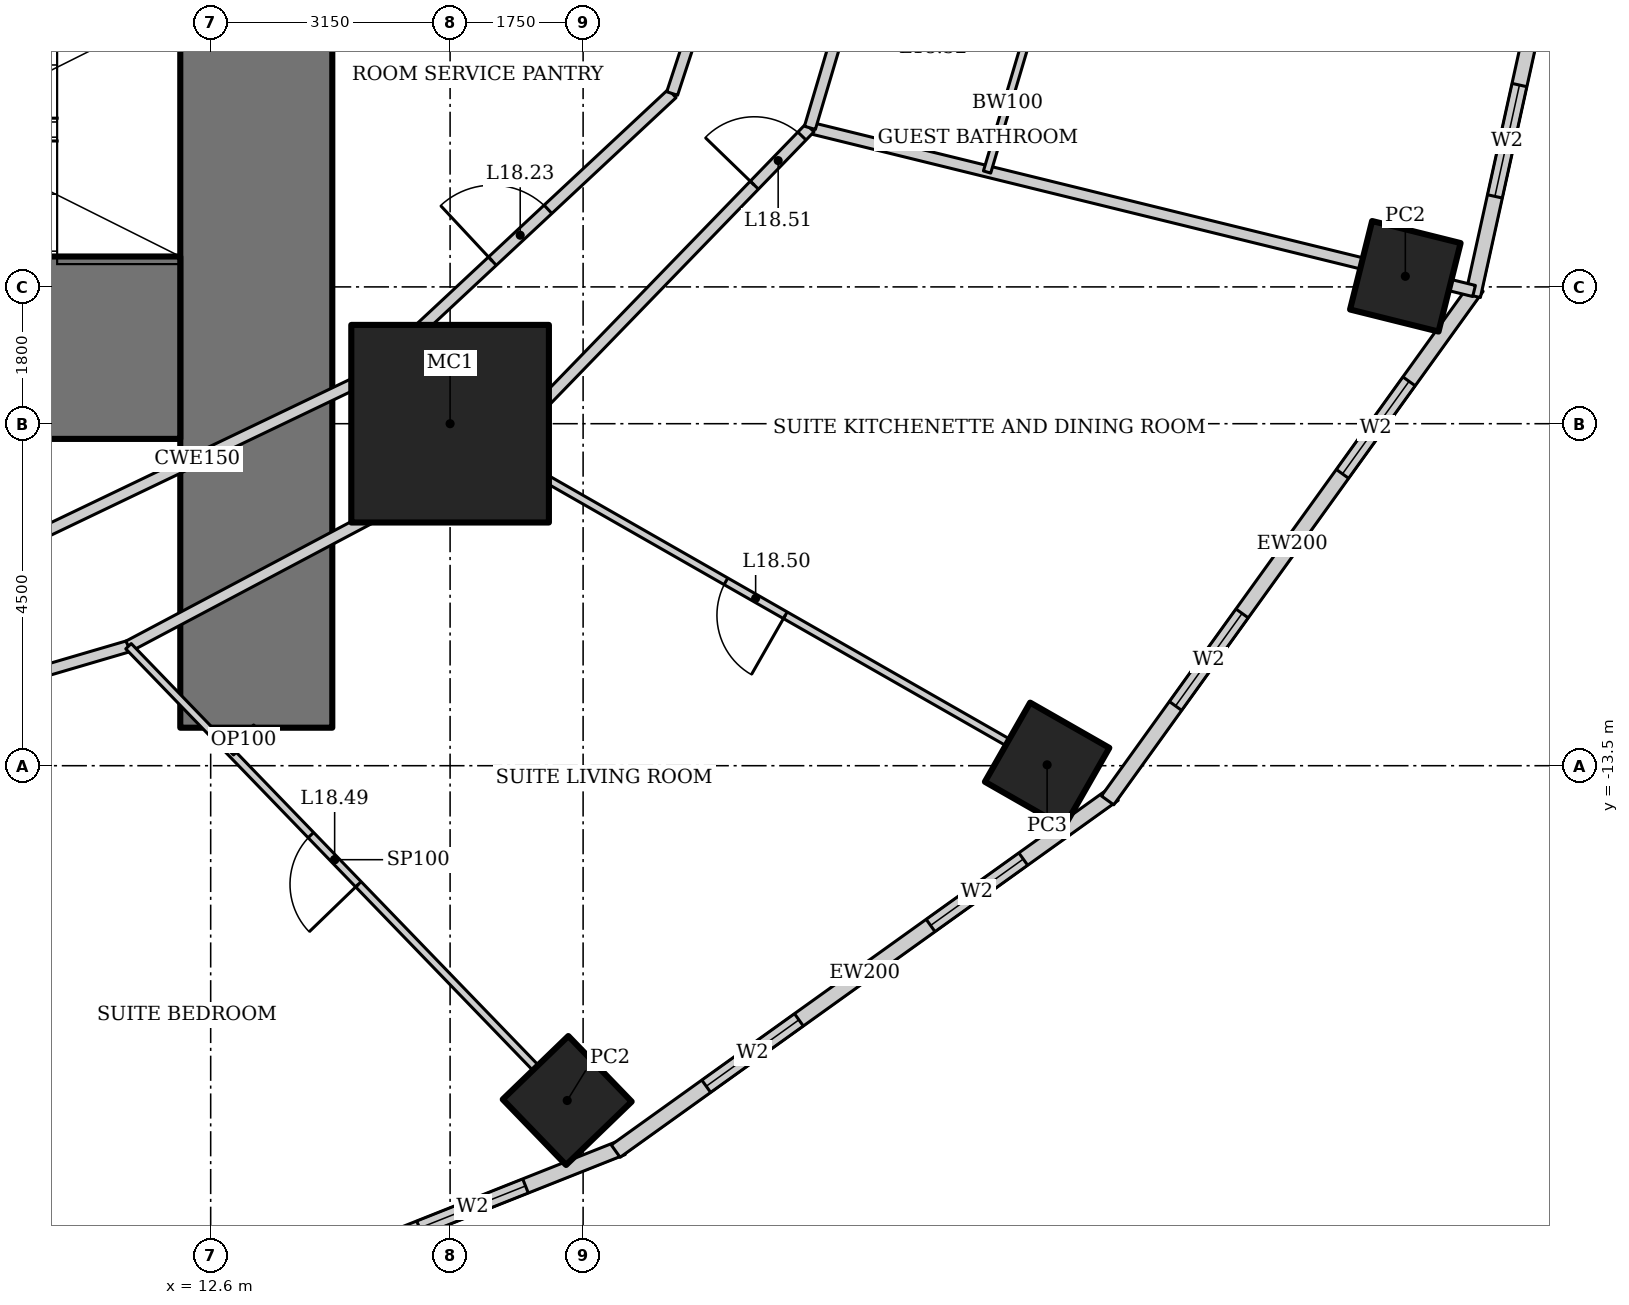
"""IFC4 building model, lengths in metres.
Left out: names, types, materials, properties, quantities, classifications, styles, units other than length and angle.
Written with IfcOpenShell. Run it as: python <this file> out.ifc"""

import sys

from ifc_helpers import new_model, si_unit, direction, frame, frame_2d, origin, origin_2d, place, context, subcontext, project, spatial, rectangle, hollow_rectangle, extrude, element, fill, save


model = new_model("IFC4")
c1 = context("Model", 3, precision=1e-05, world=origin(), true_north=direction((0.0, 1.0)))
c2 = subcontext(c1, "Body", "Model", "MODEL_VIEW")
j1 = project(units=[si_unit("LENGTHUNIT", "METRE"), si_unit("PLANEANGLEUNIT", "RADIAN")], contexts=[c1])
p1 = place(None, origin())
s1 = spatial("IfcSite", under=j1, at=p1, CompositionType="ELEMENT")
p2 = place(p1, origin())
s2 = spatial("IfcBuilding", under=s1, at=p2, CompositionType="ELEMENT")
p3 = place(p2, frame((0.0, 0.0, 80.2)))
s3 = spatial("IfcBuildingStorey", under=s2, at=p3, CompositionType="ELEMENT", Elevation=80.2)
p4 = place(p3, frame((15.75, -9.0, 0.0), z_axis=(0.0, 0.0, 1.0), x_axis=(1.0, 0.0, 0.0)))
e1 = element("IfcColumn", 1, at=p4, inside=s3, PredefinedType="COLUMN", context=c2, shape_type="SweptSolid", body=[
    extrude(hollow_rectangle(XDim=2.6, YDim=2.6, WallThickness=0.13, at=origin_2d()), origin(), (0.0, 0.0, 1.0), 3.6),
])
p5 = place(p3, frame((17.291, -17.905, 0.0), z_axis=(0.0, 0.0, 1.0), x_axis=(0.719339800339, 0.694658370459, 0.0)))
e2 = element("IfcColumn", 2, at=p5, inside=s3, PredefinedType="COLUMN", context=c2, shape_type="SweptSolid", body=[
    extrude(hollow_rectangle(XDim=1.2, YDim=1.2, WallThickness=0.1, at=origin_2d()), origin(), (0.0, 0.0, 1.0), 3.6),
])
p6 = place(p3, frame((23.605, -13.489, 0.0), z_axis=(0.0, 0.0, 1.0), x_axis=(0.496139221777, 0.86824298017, 0.0)))
e3 = element("IfcColumn", 3, at=p6, inside=s3, PredefinedType="COLUMN", context=c2, shape_type="SweptSolid", body=[
    extrude(hollow_rectangle(XDim=1.2, YDim=1.2, WallThickness=0.12, at=origin_2d()), origin(), (0.0, 0.0, 1.0), 3.6),
])
p7 = place(p3, frame((28.318, -7.06, 0.0), z_axis=(0.0, 0.0, 1.0), x_axis=(0.2419218956, 0.970295726276, 0.0)))
e4 = element("IfcColumn", 4, at=p7, inside=s3, PredefinedType="COLUMN", context=c2, shape_type="SweptSolid", body=[
    extrude(hollow_rectangle(XDim=1.2, YDim=1.2, WallThickness=0.1, at=origin_2d()), origin(), (0.0, 0.0, 1.0), 3.6),
])
p8 = place(p3, frame((13.2, -13.0, 0.0), z_axis=(0.0, 0.0, 1.0), x_axis=(0.0, 1.0, 0.0)))
e5 = element("IfcWall", 5, at=p8, inside=s3, PredefinedType="SHEAR", context=c2, shape_type="SweptSolid", body=[
    extrude(rectangle(XDim=26.0, YDim=2.0, at=frame_2d((13.0, 0.0))), origin(), (0.0, 0.0, 1.0), 3.6),
])
p9 = place(p8, frame((12.1, 0.0, 0.0)))
e6 = element("IfcOpeningElement", 6, at=p9, cuts=e5, PredefinedType="OPENING", context=c2, shape_type="SweptSolid", body=[
    extrude(rectangle(XDim=1.8, YDim=2.1, at=frame_2d((0.9, 1.05))), frame((0.0, 1.01, 0.0), z_axis=(0.0, -1.0, 0.0), x_axis=(1.0, 0.0, 0.0)), (0.0, 0.0, 1.0), 2.02),
])
p10 = place(p3, frame((-12.2, -8.0, 0.0), z_axis=(0.0, 0.0, 1.0), x_axis=(1.0, 0.0, 0.0)))
e7 = element("IfcWall", 7, at=p10, inside=s3, PredefinedType="SHEAR", context=c2, shape_type="SweptSolid", body=[
    extrude(rectangle(XDim=24.4, YDim=2.4, at=frame_2d((12.2, 0.0))), origin(), (0.0, 0.0, 1.0), 3.6),
])
p11 = place(p3, frame((10.869, -21.363, 0.0), z_axis=(0.0, 0.0, 1.0), x_axis=(0.929358351251, 0.369178892895, 0.0)))
e8 = element("IfcWall", 8, at=p11, inside=s3, PredefinedType="SOLIDWALL", context=c2, shape_type="SweptSolid", body=[
    extrude(rectangle(XDim=7.692, YDim=0.2, at=frame_2d((3.846, 0.0))), origin(), (0.0, 0.0, 1.0), 3.45),
])
p12 = place(p11, frame((1.373, 0.0, 0.5)))
e9 = element("IfcOpeningElement", 9, at=p12, cuts=e8, PredefinedType="OPENING", context=c2, shape_type="SweptSolid", body=[
    extrude(rectangle(XDim=1.5, YDim=2.2, at=frame_2d((0.75, 1.1))), frame((0.0, 0.11, 0.0), z_axis=(0.0, -1.0, 0.0), x_axis=(1.0, 0.0, 0.0)), (0.0, 0.0, 1.0), 0.22),
])
p13 = place(p11, frame((4.819, 0.0, 0.5)))
e10 = element("IfcOpeningElement", 10, at=p13, cuts=e8, PredefinedType="OPENING", context=c2, shape_type="SweptSolid", body=[
    extrude(rectangle(XDim=1.5, YDim=2.2, at=frame_2d((0.75, 1.1))), frame((0.0, 0.11, 0.0), z_axis=(0.0, -1.0, 0.0), x_axis=(1.0, 0.0, 0.0)), (0.0, 0.0, 1.0), 0.22),
])
p14 = place(p3, frame((17.929, -18.572, 0.0), z_axis=(0.0, 0.0, 1.0), x_axis=(0.812791321576, 0.582554948112, 0.0)))
e11 = element("IfcWall", 11, at=p14, inside=s3, PredefinedType="SOLIDWALL", context=c2, shape_type="SweptSolid", body=[
    extrude(rectangle(XDim=8.063, YDim=0.2, at=frame_2d((4.032, 0.0))), origin(), (0.0, 0.0, 1.0), 3.45),
])
p15 = place(p14, frame((1.466, 0.0, 0.5)))
e12 = element("IfcOpeningElement", 12, at=p15, cuts=e11, PredefinedType="OPENING", context=c2, shape_type="SweptSolid", body=[
    extrude(rectangle(XDim=1.5, YDim=2.2, at=frame_2d((0.75, 1.1))), frame((0.0, 0.11, 0.0), z_axis=(0.0, -1.0, 0.0), x_axis=(1.0, 0.0, 0.0)), (0.0, 0.0, 1.0), 0.22),
])
p16 = place(p14, frame((5.097, 0.0, 0.5)))
e13 = element("IfcOpeningElement", 13, at=p16, cuts=e11, PredefinedType="OPENING", context=c2, shape_type="SweptSolid", body=[
    extrude(rectangle(XDim=1.5, YDim=2.2, at=frame_2d((0.75, 1.1))), frame((0.0, 0.11, 0.0), z_axis=(0.0, -1.0, 0.0), x_axis=(1.0, 0.0, 0.0)), (0.0, 0.0, 1.0), 0.22),
])
p17 = place(p3, frame((24.4, -13.957, 0.0), z_axis=(0.0, 0.0, 1.0), x_axis=(0.583937613703, 0.811798536155, 0.0)))
e14 = element("IfcWall", 14, at=p17, inside=s3, PredefinedType="SOLIDWALL", context=c2, shape_type="SweptSolid", body=[
    extrude(rectangle(XDim=8.323, YDim=0.2, at=frame_2d((4.162, 0.0))), origin(), (0.0, 0.0, 1.0), 3.45),
])
p18 = place(p17, frame((1.531, 0.0, 0.5)))
e15 = element("IfcOpeningElement", 15, at=p18, cuts=e14, PredefinedType="OPENING", context=c2, shape_type="SweptSolid", body=[
    extrude(rectangle(XDim=1.5, YDim=2.2, at=frame_2d((0.75, 1.1))), frame((0.0, 0.11, 0.0), z_axis=(0.0, -1.0, 0.0), x_axis=(1.0, 0.0, 0.0)), (0.0, 0.0, 1.0), 0.22),
])
p19 = place(p17, frame((5.292, 0.0, 0.5)))
e16 = element("IfcOpeningElement", 16, at=p19, cuts=e14, PredefinedType="OPENING", context=c2, shape_type="SweptSolid", body=[
    extrude(rectangle(XDim=1.5, YDim=2.2, at=frame_2d((0.75, 1.1))), frame((0.0, 0.11, 0.0), z_axis=(0.0, -1.0, 0.0), x_axis=(1.0, 0.0, 0.0)), (0.0, 0.0, 1.0), 0.22),
])
p20 = place(p3, frame((29.208, -7.318, 0.0), z_axis=(0.0, 0.0, 1.0), x_axis=(0.215238065514, 0.976561608478, 0.0)))
e17 = element("IfcWall", 17, at=p20, inside=s3, PredefinedType="SOLIDWALL", context=c2, shape_type="SweptSolid", body=[
    extrude(rectangle(XDim=7.562, YDim=0.2, at=frame_2d((3.781, 0.0))), origin(), (0.0, 0.0, 1.0), 3.45),
])
p21 = place(p20, frame((1.341, 0.0, 0.5)))
e18 = element("IfcOpeningElement", 18, at=p21, cuts=e17, PredefinedType="OPENING", context=c2, shape_type="SweptSolid", body=[
    extrude(rectangle(XDim=1.5, YDim=2.2, at=frame_2d((0.75, 1.1))), frame((0.0, 0.11, 0.0), z_axis=(0.0, -1.0, 0.0), x_axis=(1.0, 0.0, 0.0)), (0.0, 0.0, 1.0), 0.22),
])
p22 = place(p20, frame((4.722, 0.0, 0.5)))
e19 = element("IfcOpeningElement", 19, at=p22, cuts=e17, PredefinedType="OPENING", context=c2, shape_type="SweptSolid", body=[
    extrude(rectangle(XDim=1.5, YDim=2.2, at=frame_2d((0.75, 1.1))), frame((0.0, 0.11, 0.0), z_axis=(0.0, -1.0, 0.0), x_axis=(1.0, 0.0, 0.0)), (0.0, 0.0, 1.0), 0.22),
])
p23 = place(p3, frame((10.912, -21.346, 0.0), z_axis=(0.0, 0.0, 1.0), x_axis=(-0.457117602022, 0.889406261458, 0.0)))
e20 = element("IfcWall", 20, at=p23, inside=s3, PredefinedType="PARTITIONING", context=c2, shape_type="SweptSolid", body=[
    extrude(rectangle(XDim=9.027, YDim=0.15, at=frame_2d((4.513, 0.0))), origin(), (0.0, 0.0, 1.0), 2.528),
])
p24 = place(p3, frame((29.222, -7.254, 0.0), z_axis=(0.0, 0.0, 1.0), x_axis=(-0.971128703136, 0.238556160989, 0.0)))
e21 = element("IfcWall", 21, at=p24, inside=s3, PredefinedType="PARTITIONING", context=c2, shape_type="SweptSolid", body=[
    extrude(rectangle(XDim=8.998, YDim=0.15, at=frame_2d((4.499, 0.0))), origin(), (0.0, 0.0, 1.0), 2.333),
])
p25 = place(p3, frame((6.786, -13.317, 0.0), z_axis=(0.0, 0.0, 1.0), x_axis=(0.959496227294, 0.281721475589, 0.0)))
e22 = element("IfcWall", 22, at=p25, inside=s3, PredefinedType="PARTITIONING", context=c2, shape_type="SweptSolid", body=[
    extrude(rectangle(XDim=4.933, YDim=0.15, at=frame_2d((2.466, 0.0))), origin(), (0.0, 0.0, 1.0), 3.45),
])
p26 = place(p3, frame((11.519, -11.928, 0.0), z_axis=(0.0, 0.0, 1.0), x_axis=(0.883334368785, 0.468743419071, 0.0)))
e23 = element("IfcWall", 23, at=p26, inside=s3, PredefinedType="PARTITIONING", context=c2, shape_type="SweptSolid", body=[
    extrude(rectangle(XDim=5.491, YDim=0.15, at=frame_2d((2.746, 0.0))), origin(), (0.0, 0.0, 1.0), 3.45),
])
p27 = place(p3, frame((16.369, -9.354, 0.0), z_axis=(0.0, 0.0, 1.0), x_axis=(0.695871090686, 0.71816671125, 0.0)))
e24 = element("IfcWall", 24, at=p27, inside=s3, PredefinedType="PARTITIONING", context=c2, shape_type="SweptSolid", body=[
    extrude(rectangle(XDim=5.913, YDim=0.15, at=frame_2d((2.957, 0.0))), origin(), (0.0, 0.0, 1.0), 3.45),
])
p28 = place(p27, frame((4.863, 0.0, 0.0)))
e25 = element("IfcOpeningElement", 25, at=p28, cuts=e24, PredefinedType="OPENING", context=c2, shape_type="SweptSolid", body=[
    extrude(rectangle(XDim=0.9, YDim=2.1, at=frame_2d((0.45, 1.05))), frame((0.0, 0.085, 0.0), z_axis=(0.0, -1.0, 0.0), x_axis=(1.0, 0.0, 0.0)), (0.0, 0.0, 1.0), 0.17),
])
p29 = place(p3, frame((20.484, -5.107, 0.0), z_axis=(0.0, 0.0, 1.0), x_axis=(0.284584469409, 0.95865096869, 0.0)))
e26 = element("IfcWall", 26, at=p29, inside=s3, PredefinedType="PARTITIONING", context=c2, shape_type="SweptSolid", body=[
    extrude(rectangle(XDim=5.327, YDim=0.15, at=frame_2d((2.664, 0.0))), origin(), (0.0, 0.0, 1.0), 3.45),
])
p30 = place(p29, frame((4.278, 0.0, 0.0)))
e27 = element("IfcOpeningElement", 27, at=p30, cuts=e26, PredefinedType="OPENING", context=c2, shape_type="SweptSolid", body=[
    extrude(rectangle(XDim=0.9, YDim=2.1, at=frame_2d((0.45, 1.05))), frame((0.0, 0.085, 0.0), z_axis=(0.0, -1.0, 0.0), x_axis=(1.0, 0.0, 0.0)), (0.0, 0.0, 1.0), 0.17),
])
p31 = place(p3, frame((10.177, -10.539, 0.0), z_axis=(0.0, 0.0, 1.0), x_axis=(0.901869692799, 0.43200816799, 0.0)))
e28 = element("IfcWall", 28, at=p31, inside=s3, PredefinedType="PARTITIONING", context=c2, shape_type="SweptSolid", body=[
    extrude(rectangle(XDim=4.986, YDim=0.15, at=frame_2d((2.493, 0.0))), origin(), (0.0, 0.0, 1.0), 3.45),
])
p32 = place(p3, frame((14.673, -8.385, 0.0), z_axis=(0.0, 0.0, 1.0), x_axis=(0.731260145007, 0.682098673452, 0.0)))
e29 = element("IfcWall", 29, at=p32, inside=s3, PredefinedType="PARTITIONING", context=c2, shape_type="SweptSolid", body=[
    extrude(rectangle(XDim=5.468, YDim=0.15, at=frame_2d((2.734, 0.0))), origin(), (0.0, 0.0, 1.0), 3.45),
])
p33 = place(p32, frame((2.234, 0.0, 0.0)))
e30 = element("IfcOpeningElement", 30, at=p33, cuts=e29, PredefinedType="OPENING", context=c2, shape_type="SweptSolid", body=[
    extrude(rectangle(XDim=1.0, YDim=2.1, at=frame_2d((0.5, 1.05))), frame((0.0, 0.085, 0.0), z_axis=(0.0, -1.0, 0.0), x_axis=(1.0, 0.0, 0.0)), (0.0, 0.0, 1.0), 0.17),
])
p34 = place(p3, frame((16.944, -17.545, 0.0), z_axis=(0.0, 0.0, 1.0), x_axis=(-0.694666479492, 0.719331969448, 0.0)))
e31 = element("IfcWall", 31, at=p34, inside=s3, PredefinedType="PARTITIONING", context=c2, shape_type="SweptSolid", body=[
    extrude(rectangle(XDim=7.81, YDim=0.1, at=frame_2d((3.905, 0.0))), origin(), (0.0, 0.0, 1.0), 2.528),
])
p35 = place(p34, frame((3.455, 0.0, 0.0)))
e32 = element("IfcOpeningElement", 32, at=p35, cuts=e31, PredefinedType="OPENING", context=c2, shape_type="SweptSolid", body=[
    extrude(rectangle(XDim=0.9, YDim=2.1, at=frame_2d((0.45, 1.05))), frame((0.0, 0.06, 0.0), z_axis=(0.0, -1.0, 0.0), x_axis=(1.0, 0.0, 0.0)), (0.0, 0.0, 1.0), 0.12),
])
p36 = place(p3, frame((23.171, -13.24, 0.0), z_axis=(0.0, 0.0, 1.0), x_axis=(-0.868243142124, 0.496138938357, 0.0)))
e33 = element("IfcWall", 33, at=p36, inside=s3, PredefinedType="PARTITIONING", context=c2, shape_type="SweptSolid", body=[
    extrude(rectangle(XDim=7.834, YDim=0.1, at=frame_2d((3.917, 0.0))), origin(), (0.0, 0.0, 1.0), 2.693),
])
p37 = place(p36, frame((3.467, 0.0, 0.0)))
e34 = element("IfcOpeningElement", 34, at=p37, cuts=e33, PredefinedType="OPENING", context=c2, shape_type="SweptSolid", body=[
    extrude(rectangle(XDim=0.9, YDim=2.1, at=frame_2d((0.45, 1.05))), frame((0.0, 0.06, 0.0), z_axis=(0.0, -1.0, 0.0), x_axis=(1.0, 0.0, 0.0)), (0.0, 0.0, 1.0), 0.12),
])
p38 = place(p3, frame((23.354, -3.873, 0.0), z_axis=(0.0, 0.0, 1.0), x_axis=(-0.284496480535, -0.958677084613, 0.0)))
e35 = element("IfcWall", 35, at=p38, inside=s3, PredefinedType="PARTITIONING", context=c2, shape_type="SweptSolid", body=[
    extrude(rectangle(XDim=1.894, YDim=0.1, at=frame_2d((0.947, 0.0))), origin(), (0.0, 0.0, 1.0), 3.45),
])
p39 = place(p3, frame((13.2, -13.0, 0.0), z_axis=(0.0, 0.0, 1.0), x_axis=(-0.719347134512, -0.69465077562, 0.0)))
e36 = element("IfcWall", 36, at=p39, inside=s3, PredefinedType="PARTITIONING", context=c2, shape_type="SweptSolid", body=[
    extrude(rectangle(XDim=0.465, YDim=0.1, at=frame_2d((0.232, 0.0))), origin(), (0.0, 0.0, 1.0), 3.45),
])
p40 = place(p3, frame((18.672, -4.655, 0.0), z_axis=(0.0, 0.0, 1.0), x_axis=(0.311929965981, 0.950105097515, 0.0)))
e37 = element("IfcWall", 37, at=p40, inside=s3, PredefinedType="PARTITIONING", context=c2, shape_type="SweptSolid", body=[
    extrude(rectangle(XDim=2.763, YDim=0.15, at=frame_2d((1.381, 0.0))), origin(), (0.0, 0.0, 1.0), 3.45),
])
p41 = place(p13, origin())
e38 = element("IfcWindow", 38, at=p41, inside=s3, PartitioningType="SINGLE_PANEL", PredefinedType="WINDOW", context=c2, shape_type="SweptSolid", body=[
    extrude(rectangle(XDim=1.5, YDim=2.2, at=frame_2d((0.75, 1.1))), frame((0.0, 0.03, 0.0), z_axis=(0.0, -1.0, 0.0), x_axis=(1.0, 0.0, 0.0)), (0.0, 0.0, 1.0), 0.06),
])
fill(e10, e38)
p42 = place(p15, origin())
e39 = element("IfcWindow", 39, at=p42, inside=s3, PartitioningType="SINGLE_PANEL", PredefinedType="WINDOW", context=c2, shape_type="SweptSolid", body=[
    extrude(rectangle(XDim=1.5, YDim=2.2, at=frame_2d((0.75, 1.1))), frame((0.0, 0.03, 0.0), z_axis=(0.0, -1.0, 0.0), x_axis=(1.0, 0.0, 0.0)), (0.0, 0.0, 1.0), 0.06),
])
fill(e12, e39)
p43 = place(p16, origin())
e40 = element("IfcWindow", 40, at=p43, inside=s3, PartitioningType="SINGLE_PANEL", PredefinedType="WINDOW", context=c2, shape_type="SweptSolid", body=[
    extrude(rectangle(XDim=1.5, YDim=2.2, at=frame_2d((0.75, 1.1))), frame((0.0, 0.03, 0.0), z_axis=(0.0, -1.0, 0.0), x_axis=(1.0, 0.0, 0.0)), (0.0, 0.0, 1.0), 0.06),
])
fill(e13, e40)
p44 = place(p18, origin())
e41 = element("IfcWindow", 41, at=p44, inside=s3, PartitioningType="SINGLE_PANEL", PredefinedType="WINDOW", context=c2, shape_type="SweptSolid", body=[
    extrude(rectangle(XDim=1.5, YDim=2.2, at=frame_2d((0.75, 1.1))), frame((0.0, 0.03, 0.0), z_axis=(0.0, -1.0, 0.0), x_axis=(1.0, 0.0, 0.0)), (0.0, 0.0, 1.0), 0.06),
])
fill(e15, e41)
p45 = place(p19, origin())
e42 = element("IfcWindow", 42, at=p45, inside=s3, PartitioningType="SINGLE_PANEL", PredefinedType="WINDOW", context=c2, shape_type="SweptSolid", body=[
    extrude(rectangle(XDim=1.5, YDim=2.2, at=frame_2d((0.75, 1.1))), frame((0.0, 0.03, 0.0), z_axis=(0.0, -1.0, 0.0), x_axis=(1.0, 0.0, 0.0)), (0.0, 0.0, 1.0), 0.06),
])
fill(e16, e42)
p46 = place(p21, origin())
e43 = element("IfcWindow", 43, at=p46, inside=s3, PartitioningType="SINGLE_PANEL", PredefinedType="WINDOW", context=c2, shape_type="SweptSolid", body=[
    extrude(rectangle(XDim=1.5, YDim=2.2, at=frame_2d((0.75, 1.1))), frame((0.0, 0.03, 0.0), z_axis=(0.0, -1.0, 0.0), x_axis=(1.0, 0.0, 0.0)), (0.0, 0.0, 1.0), 0.06),
])
fill(e18, e43)
p47 = place(p33, origin())
e44 = element("IfcDoor", 44, at=p47, inside=s3, OperationType="SINGLE_SWING_LEFT", PredefinedType="DOOR", context=c2, shape_type="SweptSolid", body=[
    extrude(rectangle(XDim=1.0, YDim=2.1, at=frame_2d((0.5, 1.05))), frame((0.0, 0.025, 0.0), z_axis=(0.0, -1.0, 0.0), x_axis=(1.0, 0.0, 0.0)), (0.0, 0.0, 1.0), 0.05),
])
fill(e30, e44)
p48 = place(p35, origin())
e45 = element("IfcDoor", 45, at=p48, inside=s3, OperationType="SINGLE_SWING_LEFT", PredefinedType="DOOR", context=c2, shape_type="SweptSolid", body=[
    extrude(rectangle(XDim=0.9, YDim=2.1, at=frame_2d((0.45, 1.05))), frame((0.0, 0.025, 0.0), z_axis=(0.0, -1.0, 0.0), x_axis=(1.0, 0.0, 0.0)), (0.0, 0.0, 1.0), 0.05),
])
fill(e32, e45)
p49 = place(p37, origin())
e46 = element("IfcDoor", 46, at=p49, inside=s3, OperationType="SINGLE_SWING_LEFT", PredefinedType="DOOR", context=c2, shape_type="SweptSolid", body=[
    extrude(rectangle(XDim=0.9, YDim=2.1, at=frame_2d((0.45, 1.05))), frame((0.0, 0.025, 0.0), z_axis=(0.0, -1.0, 0.0), x_axis=(1.0, 0.0, 0.0)), (0.0, 0.0, 1.0), 0.05),
])
fill(e34, e46)
p50 = place(p28, origin())
e47 = element("IfcDoor", 47, at=p50, inside=s3, OperationType="SINGLE_SWING_LEFT", PredefinedType="DOOR", context=c2, shape_type="SweptSolid", body=[
    extrude(rectangle(XDim=0.9, YDim=2.1, at=frame_2d((0.45, 1.05))), frame((0.0, 0.025, 0.0), z_axis=(0.0, -1.0, 0.0), x_axis=(1.0, 0.0, 0.0)), (0.0, 0.0, 1.0), 0.05),
])
fill(e25, e47)
save(model, sys.argv[1])
